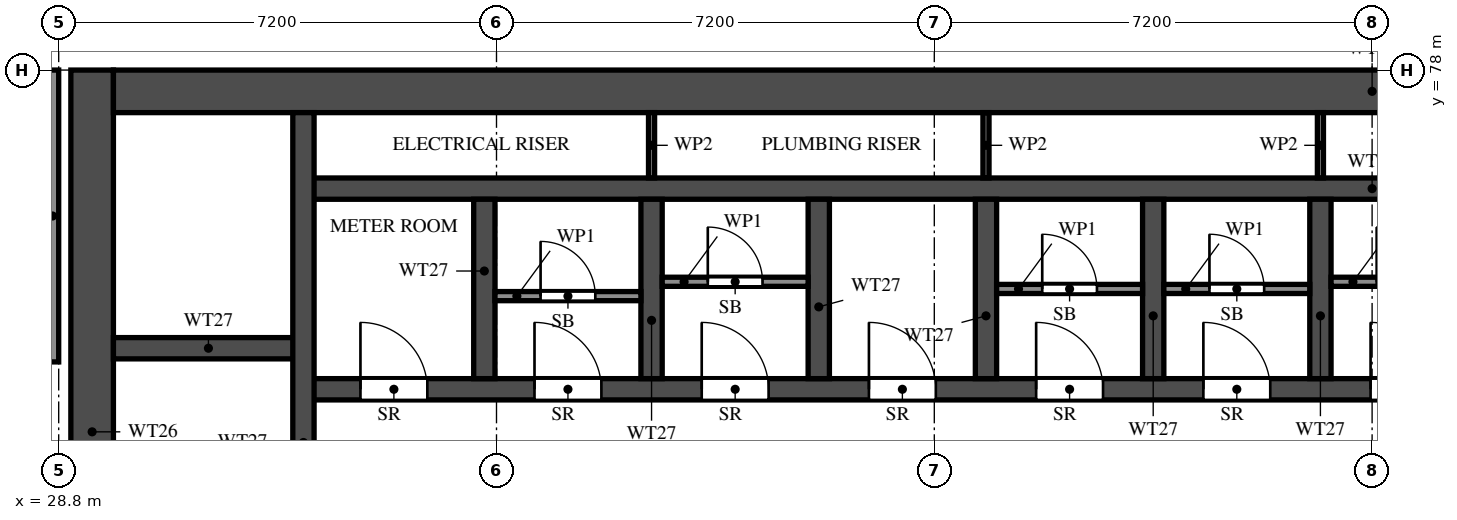
"""IFC4 building model, lengths in metres.
Left out: names, types, materials, properties, quantities, classifications, styles, units other than length and angle.
Written with IfcOpenShell. Run it as: python <this file> out.ifc"""

import sys

from ifc_helpers import new_model, si_unit, direction, frame, frame_2d, origin, place, context, subcontext, project, spatial, rectangle, extrude, element, fill, save


model = new_model("IFC4")
c1 = context("Model", 3, precision=1e-05, world=origin(), true_north=direction((0.0, 1.0)))
c2 = subcontext(c1, "Body", "Model", "MODEL_VIEW")
j1 = project(units=[si_unit("LENGTHUNIT", "METRE"), si_unit("PLANEANGLEUNIT", "RADIAN")], contexts=[c1])
p1 = place(None, origin())
s1 = spatial("IfcSite", under=j1, at=p1, CompositionType="ELEMENT")
p2 = place(p1, origin())
s2 = spatial("IfcBuilding", under=s1, at=p2, CompositionType="ELEMENT")
p3 = place(p2, frame((0.0, 0.0, 123.5)))
s3 = spatial("IfcBuildingStorey", under=s2, at=p3, CompositionType="ELEMENT", Elevation=123.5)
p4 = place(p3, frame((29.35, 66.1, 0.0), z_axis=(0.0, 0.0, 1.0), x_axis=(0.0, 1.0, 0.0)))
e1 = element("IfcWall", 1, at=p4, inside=s3, PredefinedType="SHEAR", context=c2, shape_type="SweptSolid", body=[
    extrude(rectangle(XDim=11.9, YDim=0.7, at=frame_2d((5.95, 0.0))), origin(), (0.0, 0.0, 1.0), 3.2),
])
p5 = place(p3, frame((29.7, 77.65, 0.0), z_axis=(0.0, 0.0, 1.0), x_axis=(1.0, 0.0, 0.0)))
e2 = element("IfcWall", 2, at=p5, inside=s3, PredefinedType="SHEAR", context=c2, shape_type="SweptSolid", body=[
    extrude(rectangle(XDim=41.4, YDim=0.7, at=frame_2d((20.7, 0.0))), origin(), (0.0, 0.0, 1.0), 3.2),
])
p6 = place(p3, frame((32.825, 72.75, 0.0), z_axis=(0.0, 0.0, 1.0), x_axis=(1.0, 0.0, 0.0)))
e3 = element("IfcWall", 3, at=p6, inside=s3, PredefinedType="SHEAR", context=c2, shape_type="SweptSolid", body=[
    extrude(rectangle(XDim=35.15, YDim=0.35, at=frame_2d((17.575, 0.0))), origin(), (0.0, 0.0, 1.0), 3.2),
])
p7 = place(p6, frame((19.8, 0.0, 0.0)))
e4 = element("IfcOpeningElement", 4, at=p7, cuts=e3, PredefinedType="OPENING", context=c2, shape_type="SweptSolid", body=[
    extrude(rectangle(XDim=1.1, YDim=2.1, at=frame_2d((0.55, 1.05))), frame((0.0, 0.185, 0.0), z_axis=(0.0, -1.0, 0.0), x_axis=(1.0, 0.0, 0.0)), (0.0, 0.0, 1.0), 0.37),
])
p8 = place(p6, frame((27.7, 0.0, 0.0)))
e5 = element("IfcOpeningElement", 5, at=p8, cuts=e3, PredefinedType="OPENING", context=c2, shape_type="SweptSolid", body=[
    extrude(rectangle(XDim=1.1, YDim=2.1, at=frame_2d((0.55, 1.05))), frame((0.0, 0.185, 0.0), z_axis=(0.0, -1.0, 0.0), x_axis=(1.0, 0.0, 0.0)), (0.0, 0.0, 1.0), 0.37),
])
p9 = place(p6, frame((30.3, 0.0, 0.0)))
e6 = element("IfcOpeningElement", 6, at=p9, cuts=e3, PredefinedType="OPENING", context=c2, shape_type="SweptSolid", body=[
    extrude(rectangle(XDim=1.1, YDim=2.1, at=frame_2d((0.55, 1.05))), frame((0.0, 0.185, 0.0), z_axis=(0.0, -1.0, 0.0), x_axis=(1.0, 0.0, 0.0)), (0.0, 0.0, 1.0), 0.37),
])
p10 = place(p6, frame((3.8, 0.0, 0.0)))
e7 = element("IfcOpeningElement", 7, at=p10, cuts=e3, PredefinedType="OPENING", context=c2, shape_type="SweptSolid", body=[
    extrude(rectangle(XDim=1.1, YDim=2.1, at=frame_2d((0.55, 1.05))), frame((0.0, 0.185, 0.0), z_axis=(0.0, -1.0, 0.0), x_axis=(1.0, 0.0, 0.0)), (0.0, 0.0, 1.0), 0.37),
])
p11 = place(p6, frame((6.55, 0.0, 0.0)))
e8 = element("IfcOpeningElement", 8, at=p11, cuts=e3, PredefinedType="OPENING", context=c2, shape_type="SweptSolid", body=[
    extrude(rectangle(XDim=1.1, YDim=2.1, at=frame_2d((0.55, 1.05))), frame((0.0, 0.185, 0.0), z_axis=(0.0, -1.0, 0.0), x_axis=(1.0, 0.0, 0.0)), (0.0, 0.0, 1.0), 0.37),
])
p12 = place(p6, frame((9.3, 0.0, 0.0)))
e9 = element("IfcOpeningElement", 9, at=p12, cuts=e3, PredefinedType="OPENING", context=c2, shape_type="SweptSolid", body=[
    extrude(rectangle(XDim=1.1, YDim=2.1, at=frame_2d((0.55, 1.05))), frame((0.0, 0.185, 0.0), z_axis=(0.0, -1.0, 0.0), x_axis=(1.0, 0.0, 0.0)), (0.0, 0.0, 1.0), 0.37),
])
p13 = place(p6, frame((12.05, 0.0, 0.0)))
e10 = element("IfcOpeningElement", 10, at=p13, cuts=e3, PredefinedType="OPENING", context=c2, shape_type="SweptSolid", body=[
    extrude(rectangle(XDim=1.1, YDim=2.1, at=frame_2d((0.55, 1.05))), frame((0.0, 0.185, 0.0), z_axis=(0.0, -1.0, 0.0), x_axis=(1.0, 0.0, 0.0)), (0.0, 0.0, 1.0), 0.37),
])
p14 = place(p6, frame((14.8, 0.0, 0.0)))
e11 = element("IfcOpeningElement", 11, at=p14, cuts=e3, PredefinedType="OPENING", context=c2, shape_type="SweptSolid", body=[
    extrude(rectangle(XDim=1.1, YDim=2.1, at=frame_2d((0.55, 1.05))), frame((0.0, 0.185, 0.0), z_axis=(0.0, -1.0, 0.0), x_axis=(1.0, 0.0, 0.0)), (0.0, 0.0, 1.0), 0.37),
])
p15 = place(p6, frame((17.55, 0.0, 0.0)))
e12 = element("IfcOpeningElement", 12, at=p15, cuts=e3, PredefinedType="OPENING", context=c2, shape_type="SweptSolid", body=[
    extrude(rectangle(XDim=1.1, YDim=2.1, at=frame_2d((0.55, 1.05))), frame((0.0, 0.185, 0.0), z_axis=(0.0, -1.0, 0.0), x_axis=(1.0, 0.0, 0.0)), (0.0, 0.0, 1.0), 0.37),
])
p16 = place(p6, frame((0.938, 0.0, 0.0)))
e13 = element("IfcOpeningElement", 13, at=p16, cuts=e3, PredefinedType="OPENING", context=c2, shape_type="SweptSolid", body=[
    extrude(rectangle(XDim=1.1, YDim=2.1, at=frame_2d((0.55, 1.05))), frame((0.0, 0.185, 0.0), z_axis=(0.0, -1.0, 0.0), x_axis=(1.0, 0.0, 0.0)), (0.0, 0.0, 1.0), 0.37),
])
p17 = place(p3, frame((32.825, 76.05, 0.0), z_axis=(0.0, 0.0, 1.0), x_axis=(1.0, 0.0, 0.0)))
e14 = element("IfcWall", 14, at=p17, inside=s3, PredefinedType="SHEAR", context=c2, shape_type="SweptSolid", body=[
    extrude(rectangle(XDim=35.15, YDim=0.35, at=frame_2d((17.575, 0.0))), origin(), (0.0, 0.0, 1.0), 3.2),
])
p18 = place(p3, frame((29.7, 73.425, 0.0), z_axis=(0.0, 0.0, 1.0), x_axis=(1.0, 0.0, 0.0)))
e15 = element("IfcWall", 15, at=p18, inside=s3, PredefinedType="SHEAR", context=c2, shape_type="SweptSolid", body=[
    extrude(rectangle(XDim=3.125, YDim=0.35, at=frame_2d((1.562, 0.0))), origin(), (0.0, 0.0, 1.0), 3.2),
])
p19 = place(p3, frame((32.825, 66.45, 0.0), z_axis=(0.0, 0.0, 1.0), x_axis=(0.0, 1.0, 0.0)))
e16 = element("IfcWall", 16, at=p19, inside=s3, PredefinedType="SHEAR", context=c2, shape_type="SweptSolid", body=[
    extrude(rectangle(XDim=10.85, YDim=0.35, at=frame_2d((5.425, 0.0))), origin(), (0.0, 0.0, 1.0), 3.2),
])
for number, where, z_axis, x_axis in (
    (17, (35.8, 72.925, 0.0), (0.0, 0.0, 1.0), (0.0, 1.0, 0.0)),
    (18, (38.55, 72.925, 0.0), (0.0, 0.0, 1.0), (0.0, 1.0, 0.0)),
    (19, (41.3, 72.925, 0.0), (0.0, 0.0, 1.0), (0.0, 1.0, 0.0)),
    (20, (44.05, 72.925, 0.0), (0.0, 0.0, 1.0), (0.0, 1.0, 0.0)),
    (21, (46.8, 72.925, 0.0), (0.0, 0.0, 1.0), (0.0, 1.0, 0.0)),
    (22, (49.55, 72.925, 0.0), (0.0, 0.0, 1.0), (0.0, 1.0, 0.0)),
):
    element("IfcWall", number, at=place(p3, frame(where, z_axis=z_axis, x_axis=x_axis)), inside=s3, PredefinedType="SHEAR", context=c2, shape_type="SweptSolid", body=[
        extrude(rectangle(XDim=2.95, YDim=0.35, at=frame_2d((1.475, 0.0))), origin(), (0.0, 0.0, 1.0), 3.2),
    ])
p20 = place(p3, frame((35.975, 74.282, 0.0), z_axis=(0.0, 0.0, 1.0), x_axis=(1.0, 0.0, 0.0)))
e23 = element("IfcWall", 23, at=p20, inside=s3, PredefinedType="PARTITIONING", context=c2, shape_type="SweptSolid", body=[
    extrude(rectangle(XDim=2.4, YDim=0.15, at=frame_2d((1.2, 0.0))), origin(), (0.0, 0.0, 1.0), 3.2),
])
p21 = place(p20, frame((0.75, 0.0, 0.0)))
e24 = element("IfcOpeningElement", 24, at=p21, cuts=e23, PredefinedType="OPENING", context=c2, shape_type="SweptSolid", body=[
    extrude(rectangle(XDim=0.9, YDim=2.1, at=frame_2d((0.45, 1.05))), frame((0.0, 0.085, 0.0), z_axis=(0.0, -1.0, 0.0), x_axis=(1.0, 0.0, 0.0)), (0.0, 0.0, 1.0), 0.17),
])
p22 = place(p3, frame((38.725, 74.518, 0.0), z_axis=(0.0, 0.0, 1.0), x_axis=(1.0, 0.0, 0.0)))
e25 = element("IfcWall", 25, at=p22, inside=s3, PredefinedType="PARTITIONING", context=c2, shape_type="SweptSolid", body=[
    extrude(rectangle(XDim=2.4, YDim=0.15, at=frame_2d((1.2, 0.0))), origin(), (0.0, 0.0, 1.0), 3.2),
])
p23 = place(p22, frame((0.75, 0.0, 0.0)))
e26 = element("IfcOpeningElement", 26, at=p23, cuts=e25, PredefinedType="OPENING", context=c2, shape_type="SweptSolid", body=[
    extrude(rectangle(XDim=0.9, YDim=2.1, at=frame_2d((0.45, 1.05))), frame((0.0, 0.085, 0.0), z_axis=(0.0, -1.0, 0.0), x_axis=(1.0, 0.0, 0.0)), (0.0, 0.0, 1.0), 0.17),
])
p24 = place(p3, frame((44.225, 74.4, 0.0), z_axis=(0.0, 0.0, 1.0), x_axis=(1.0, 0.0, 0.0)))
e27 = element("IfcWall", 27, at=p24, inside=s3, PredefinedType="PARTITIONING", context=c2, shape_type="SweptSolid", body=[
    extrude(rectangle(XDim=2.4, YDim=0.15, at=frame_2d((1.2, 0.0))), origin(), (0.0, 0.0, 1.0), 3.2),
])
p25 = place(p24, frame((0.75, 0.0, 0.0)))
e28 = element("IfcOpeningElement", 28, at=p25, cuts=e27, PredefinedType="OPENING", context=c2, shape_type="SweptSolid", body=[
    extrude(rectangle(XDim=0.9, YDim=2.1, at=frame_2d((0.45, 1.05))), frame((0.0, 0.085, 0.0), z_axis=(0.0, -1.0, 0.0), x_axis=(1.0, 0.0, 0.0)), (0.0, 0.0, 1.0), 0.17),
])
p26 = place(p3, frame((46.975, 74.4, 0.0), z_axis=(0.0, 0.0, 1.0), x_axis=(1.0, 0.0, 0.0)))
e29 = element("IfcWall", 29, at=p26, inside=s3, PredefinedType="PARTITIONING", context=c2, shape_type="SweptSolid", body=[
    extrude(rectangle(XDim=2.4, YDim=0.15, at=frame_2d((1.2, 0.0))), origin(), (0.0, 0.0, 1.0), 3.2),
])
p27 = place(p26, frame((0.75, 0.0, 0.0)))
e30 = element("IfcOpeningElement", 30, at=p27, cuts=e29, PredefinedType="OPENING", context=c2, shape_type="SweptSolid", body=[
    extrude(rectangle(XDim=0.9, YDim=2.1, at=frame_2d((0.45, 1.05))), frame((0.0, 0.085, 0.0), z_axis=(0.0, -1.0, 0.0), x_axis=(1.0, 0.0, 0.0)), (0.0, 0.0, 1.0), 0.17),
])
p28 = place(p3, frame((49.725, 74.518, 0.0), z_axis=(0.0, 0.0, 1.0), x_axis=(1.0, 0.0, 0.0)))
e31 = element("IfcWall", 31, at=p28, inside=s3, PredefinedType="PARTITIONING", context=c2, shape_type="SweptSolid", body=[
    extrude(rectangle(XDim=2.4, YDim=0.15, at=frame_2d((1.2, 0.0))), origin(), (0.0, 0.0, 1.0), 3.2),
])
p29 = place(p28, frame((0.75, 0.0, 0.0)))
e32 = element("IfcOpeningElement", 32, at=p29, cuts=e31, PredefinedType="OPENING", context=c2, shape_type="SweptSolid", body=[
    extrude(rectangle(XDim=0.9, YDim=2.1, at=frame_2d((0.45, 1.05))), frame((0.0, 0.085, 0.0), z_axis=(0.0, -1.0, 0.0), x_axis=(1.0, 0.0, 0.0)), (0.0, 0.0, 1.0), 0.17),
])
for number, where, z_axis, x_axis in (
    (33, (38.55, 76.225, 0.0), (0.0, 0.0, 1.0), (0.0, 1.0, 0.0)),
    (34, (44.05, 76.225, 0.0), (0.0, 0.0, 1.0), (0.0, 1.0, 0.0)),
    (35, (49.55, 76.225, 0.0), (0.0, 0.0, 1.0), (0.0, 1.0, 0.0)),
):
    element("IfcWall", number, at=place(p3, frame(where, z_axis=z_axis, x_axis=x_axis)), inside=s3, PredefinedType="PARTITIONING", context=c2, shape_type="SweptSolid", body=[
        extrude(rectangle(XDim=1.075, YDim=0.1, at=frame_2d((0.538, 0.0))), origin(), (0.0, 0.0, 1.0), 3.2),
    ])
p30 = place(p3, frame((28.7, 73.2, 0.0), z_axis=(0.0, 0.0, 1.0), x_axis=(0.0, 1.0, 0.0)))
e36 = element("IfcWall", 36, at=p30, inside=s3, PredefinedType="SOLIDWALL", context=c2, shape_type="SweptSolid", body=[
    extrude(rectangle(XDim=4.8, YDim=0.2, at=frame_2d((2.4, 0.0))), origin(), (0.0, 0.0, 1.0), 3.2),
])
p31 = place(p10, origin())
e37 = element("IfcDoor", 37, at=p31, inside=s3, OperationType="SINGLE_SWING_LEFT", PredefinedType="DOOR", context=c2, shape_type="SweptSolid", body=[
    extrude(rectangle(XDim=1.1, YDim=2.1, at=frame_2d((0.55, 1.05))), frame((0.0, 0.025, 0.0), z_axis=(0.0, -1.0, 0.0), x_axis=(1.0, 0.0, 0.0)), (0.0, 0.0, 1.0), 0.05),
])
fill(e7, e37)
p32 = place(p21, origin())
e38 = element("IfcDoor", 38, at=p32, inside=s3, OperationType="SINGLE_SWING_LEFT", PredefinedType="DOOR", context=c2, shape_type="SweptSolid", body=[
    extrude(rectangle(XDim=0.9, YDim=2.1, at=frame_2d((0.45, 1.05))), frame((0.0, 0.025, 0.0), z_axis=(0.0, -1.0, 0.0), x_axis=(1.0, 0.0, 0.0)), (0.0, 0.0, 1.0), 0.05),
])
fill(e24, e38)
p33 = place(p11, origin())
e39 = element("IfcDoor", 39, at=p33, inside=s3, OperationType="SINGLE_SWING_RIGHT", PredefinedType="DOOR", context=c2, shape_type="SweptSolid", body=[
    extrude(rectangle(XDim=1.1, YDim=2.1, at=frame_2d((0.55, 1.05))), frame((0.0, 0.025, 0.0), z_axis=(0.0, -1.0, 0.0), x_axis=(1.0, 0.0, 0.0)), (0.0, 0.0, 1.0), 0.05),
])
fill(e8, e39)
p34 = place(p23, origin())
e40 = element("IfcDoor", 40, at=p34, inside=s3, OperationType="SINGLE_SWING_LEFT", PredefinedType="DOOR", context=c2, shape_type="SweptSolid", body=[
    extrude(rectangle(XDim=0.9, YDim=2.1, at=frame_2d((0.45, 1.05))), frame((0.0, 0.025, 0.0), z_axis=(0.0, -1.0, 0.0), x_axis=(1.0, 0.0, 0.0)), (0.0, 0.0, 1.0), 0.05),
])
fill(e26, e40)
p35 = place(p12, origin())
e41 = element("IfcDoor", 41, at=p35, inside=s3, OperationType="SINGLE_SWING_LEFT", PredefinedType="DOOR", context=c2, shape_type="SweptSolid", body=[
    extrude(rectangle(XDim=1.1, YDim=2.1, at=frame_2d((0.55, 1.05))), frame((0.0, 0.025, 0.0), z_axis=(0.0, -1.0, 0.0), x_axis=(1.0, 0.0, 0.0)), (0.0, 0.0, 1.0), 0.05),
])
fill(e9, e41)
p36 = place(p13, origin())
e42 = element("IfcDoor", 42, at=p36, inside=s3, OperationType="SINGLE_SWING_RIGHT", PredefinedType="DOOR", context=c2, shape_type="SweptSolid", body=[
    extrude(rectangle(XDim=1.1, YDim=2.1, at=frame_2d((0.55, 1.05))), frame((0.0, 0.025, 0.0), z_axis=(0.0, -1.0, 0.0), x_axis=(1.0, 0.0, 0.0)), (0.0, 0.0, 1.0), 0.05),
])
fill(e10, e42)
p37 = place(p25, origin())
e43 = element("IfcDoor", 43, at=p37, inside=s3, OperationType="SINGLE_SWING_RIGHT", PredefinedType="DOOR", context=c2, shape_type="SweptSolid", body=[
    extrude(rectangle(XDim=0.9, YDim=2.1, at=frame_2d((0.45, 1.05))), frame((0.0, 0.025, 0.0), z_axis=(0.0, -1.0, 0.0), x_axis=(1.0, 0.0, 0.0)), (0.0, 0.0, 1.0), 0.05),
])
fill(e28, e43)
p38 = place(p14, origin())
e44 = element("IfcDoor", 44, at=p38, inside=s3, OperationType="SINGLE_SWING_LEFT", PredefinedType="DOOR", context=c2, shape_type="SweptSolid", body=[
    extrude(rectangle(XDim=1.1, YDim=2.1, at=frame_2d((0.55, 1.05))), frame((0.0, 0.025, 0.0), z_axis=(0.0, -1.0, 0.0), x_axis=(1.0, 0.0, 0.0)), (0.0, 0.0, 1.0), 0.05),
])
fill(e11, e44)
p39 = place(p27, origin())
e45 = element("IfcDoor", 45, at=p39, inside=s3, OperationType="SINGLE_SWING_LEFT", PredefinedType="DOOR", context=c2, shape_type="SweptSolid", body=[
    extrude(rectangle(XDim=0.9, YDim=2.1, at=frame_2d((0.45, 1.05))), frame((0.0, 0.025, 0.0), z_axis=(0.0, -1.0, 0.0), x_axis=(1.0, 0.0, 0.0)), (0.0, 0.0, 1.0), 0.05),
])
fill(e30, e45)
p40 = place(p15, origin())
e46 = element("IfcDoor", 46, at=p40, inside=s3, OperationType="SINGLE_SWING_RIGHT", PredefinedType="DOOR", context=c2, shape_type="SweptSolid", body=[
    extrude(rectangle(XDim=1.1, YDim=2.1, at=frame_2d((0.55, 1.05))), frame((0.0, 0.025, 0.0), z_axis=(0.0, -1.0, 0.0), x_axis=(1.0, 0.0, 0.0)), (0.0, 0.0, 1.0), 0.05),
])
fill(e12, e46)
p41 = place(p29, origin())
e47 = element("IfcDoor", 47, at=p41, inside=s3, OperationType="SINGLE_SWING_LEFT", PredefinedType="DOOR", context=c2, shape_type="SweptSolid", body=[
    extrude(rectangle(XDim=0.9, YDim=2.1, at=frame_2d((0.45, 1.05))), frame((0.0, 0.025, 0.0), z_axis=(0.0, -1.0, 0.0), x_axis=(1.0, 0.0, 0.0)), (0.0, 0.0, 1.0), 0.05),
])
fill(e32, e47)
p42 = place(p16, origin())
e48 = element("IfcDoor", 48, at=p42, inside=s3, OperationType="SINGLE_SWING_LEFT", PredefinedType="DOOR", context=c2, shape_type="SweptSolid", body=[
    extrude(rectangle(XDim=1.1, YDim=2.1, at=frame_2d((0.55, 1.05))), frame((0.0, 0.025, 0.0), z_axis=(0.0, -1.0, 0.0), x_axis=(1.0, 0.0, 0.0)), (0.0, 0.0, 1.0), 0.05),
])
fill(e13, e48)
save(model, sys.argv[1])
